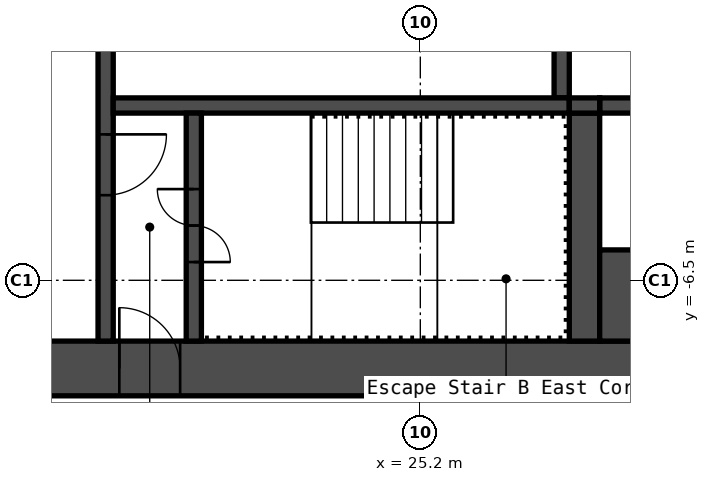
"""IFC4 building model, lengths in metres.
Left out: names, types, materials, properties, quantities, classifications, styles, units other than length and angle.
Written with IfcOpenShell. Run it as: python <this file> out.ifc"""

import sys

from ifc_helpers import new_model, si_unit, direction, frame, frame_2d, origin, place, context, subcontext, project, spatial, rectangle, extrude, element, fill, save


model = new_model("IFC4")
c1 = context("Model", 3, precision=1e-05, world=origin(), true_north=direction((0.0, 1.0)))
c2 = subcontext(c1, "Body", "Model", "MODEL_VIEW")
j1 = project(units=[si_unit("LENGTHUNIT", "METRE"), si_unit("PLANEANGLEUNIT", "RADIAN")], contexts=[c1])
p1 = place(None, origin())
s1 = spatial("IfcSite", under=j1, at=p1, CompositionType="ELEMENT")
p2 = place(p1, origin())
s2 = spatial("IfcBuilding", under=s1, at=p2, CompositionType="ELEMENT")
p3 = place(p2, frame((0.0, 0.0, 156.6)))
s3 = spatial("IfcBuildingStorey", under=s2, at=p3, CompositionType="ELEMENT", Elevation=156.6)
p4 = place(p3, frame((17.7, -7.95, 0.0), z_axis=(0.0, 0.0, 1.0), x_axis=(1.0, 0.0, 0.0)))
e1 = element("IfcWall", 1, at=p4, inside=s3, PredefinedType="SHEAR", context=c2, shape_type="SweptSolid", body=[
    extrude(rectangle(XDim=15.0, YDim=0.9, at=frame_2d((7.5, 0.0))), origin(), (0.0, 0.0, 1.0), 2.75),
])
p5 = place(p4, frame((2.55, 0.0, 0.0)))
e2 = element("IfcOpeningElement", 2, at=p5, cuts=e1, PredefinedType="OPENING", context=c2, shape_type="SweptSolid", body=[
    extrude(rectangle(XDim=1.0, YDim=2.1, at=frame_2d((0.5, 1.05))), frame((0.0, 0.46, 0.0), z_axis=(0.0, -1.0, 0.0), x_axis=(1.0, 0.0, 0.0)), (0.0, 0.0, 1.0), 0.92),
])
p6 = place(p3, frame((20.025, -7.5, 0.0), z_axis=(0.0, 0.0, 1.0), x_axis=(0.0, 1.0, 0.0)))
e3 = element("IfcWall", 3, at=p6, inside=s3, PredefinedType="SHEAR", context=c2, shape_type="SweptSolid", body=[
    extrude(rectangle(XDim=6.3, YDim=0.25, at=frame_2d((3.15, 0.0))), origin(), (0.0, 0.0, 1.0), 2.75),
])
p7 = place(p6, frame((2.4, 0.0, 0.0)))
e4 = element("IfcOpeningElement", 4, at=p7, cuts=e3, PredefinedType="OPENING", context=c2, shape_type="SweptSolid", body=[
    extrude(rectangle(XDim=1.0, YDim=2.1, at=frame_2d((0.5, 1.05))), frame((0.0, 0.135, 0.0), z_axis=(0.0, -1.0, 0.0), x_axis=(1.0, 0.0, 0.0)), (0.0, 0.0, 1.0), 0.27),
])
p8 = place(p3, frame((27.525, -3.5, 0.0), z_axis=(0.0, 0.0, 1.0), x_axis=(0.0, 1.0, 0.0)))
e5 = element("IfcWall", 5, at=p8, inside=s3, PredefinedType="SHEAR", context=c2, shape_type="SweptSolid", body=[
    extrude(rectangle(XDim=2.05, YDim=0.25, at=frame_2d((1.025, 0.0))), origin(), (0.0, 0.0, 1.0), 2.75),
])
p9 = place(p3, frame((20.15, -3.625, 0.0), z_axis=(0.0, 0.0, 1.0), x_axis=(1.0, 0.0, 0.0)))
e6 = element("IfcWall", 6, at=p9, inside=s3, PredefinedType="SHEAR", context=c2, shape_type="SweptSolid", body=[
    extrude(rectangle(XDim=7.5, YDim=0.25, at=frame_2d((3.75, 0.0))), origin(), (0.0, 0.0, 1.0), 2.75),
])
p10 = place(p3, frame((21.475, -7.5, 0.0), z_axis=(0.0, 0.0, 1.0), x_axis=(0.0, 1.0, 0.0)))
e7 = element("IfcWall", 7, at=p10, inside=s3, PredefinedType="SHEAR", context=c2, shape_type="SweptSolid", body=[
    extrude(rectangle(XDim=3.75, YDim=0.25, at=frame_2d((1.875, 0.0))), origin(), (0.0, 0.0, 1.0), 2.75),
])
p11 = place(p10, frame((1.3, 0.0, 0.0)))
e8 = element("IfcOpeningElement", 8, at=p11, cuts=e7, PredefinedType="OPENING", context=c2, shape_type="SweptSolid", body=[
    extrude(rectangle(XDim=1.2, YDim=2.1, at=frame_2d((0.6, 1.05))), frame((0.0, 0.135, 0.0), z_axis=(0.0, -1.0, 0.0), x_axis=(1.0, 0.0, 0.0)), (0.0, 0.0, 1.0), 0.27),
])
p12 = place(p3, frame((27.9, -7.5, 0.0), z_axis=(0.0, 0.0, 1.0), x_axis=(0.0, 1.0, 0.0)))
e9 = element("IfcWall", 9, at=p12, inside=s3, PredefinedType="SHEAR", context=c2, shape_type="SweptSolid", body=[
    extrude(rectangle(XDim=3.75, YDim=0.5, at=frame_2d((1.875, 0.0))), origin(), (0.0, 0.0, 1.0), 2.75),
])
p13 = place(p3, frame((28.15, -3.625, 0.0), z_axis=(0.0, 0.0, 1.0), x_axis=(1.0, 0.0, 0.0)))
e10 = element("IfcWall", 10, at=p13, inside=s3, PredefinedType="SHEAR", context=c2, shape_type="SweptSolid", body=[
    extrude(rectangle(XDim=4.55, YDim=0.25, at=frame_2d((2.275, 0.0))), origin(), (0.0, 0.0, 1.0), 2.75),
])
p14 = place(p3, frame((28.15, -6.75, 0.0), z_axis=(0.0, 0.0, 1.0), x_axis=(1.0, 0.0, 0.0)))
e11 = element("IfcWall", 11, at=p14, inside=s3, PredefinedType="SHEAR", context=c2, shape_type="SweptSolid", body=[
    extrude(rectangle(XDim=4.55, YDim=1.5, at=frame_2d((2.275, 0.0))), origin(), (0.0, 0.0, 1.0), 2.75),
])
p15 = place(p3, frame((27.65, -3.625, 0.0), z_axis=(0.0, 0.0, 1.0), x_axis=(1.0, 0.0, 0.0)))
e12 = element("IfcWall", 12, at=p15, inside=s3, PredefinedType="SHEAR", context=c2, shape_type="SweptSolid", body=[
    extrude(rectangle(XDim=0.5, YDim=0.25, at=frame_2d((0.25, 0.0))), origin(), (0.0, 0.0, 1.0), 2.75),
])
p16 = place(p5, origin())
e13 = element("IfcDoor", 13, at=p16, inside=s3, OperationType="SINGLE_SWING_RIGHT", PredefinedType="DOOR", context=c2, shape_type="SweptSolid", body=[
    extrude(rectangle(XDim=1.0, YDim=2.1, at=frame_2d((0.5, 1.05))), frame((0.0, 0.025, 0.0), z_axis=(0.0, -1.0, 0.0), x_axis=(1.0, 0.0, 0.0)), (0.0, 0.0, 1.0), 0.05),
])
fill(e2, e13)
p17 = place(p11, origin())
e14 = element("IfcDoor", 14, at=p17, inside=s3, OperationType="DOUBLE_DOOR_SINGLE_SWING", PredefinedType="DOOR", context=c2, shape_type="SweptSolid", body=[
    extrude(rectangle(XDim=1.2, YDim=2.1, at=frame_2d((0.6, 1.05))), frame((0.0, 0.025, 0.0), z_axis=(0.0, -1.0, 0.0), x_axis=(1.0, 0.0, 0.0)), (0.0, 0.0, 1.0), 0.05),
])
fill(e8, e14)
p18 = place(p7, origin())
e15 = element("IfcDoor", 15, at=p18, inside=s3, OperationType="SINGLE_SWING_RIGHT", PredefinedType="DOOR", context=c2, shape_type="SweptSolid", body=[
    extrude(rectangle(XDim=1.0, YDim=2.1, at=frame_2d((0.5, 1.05))), frame((0.0, 0.025, 0.0), z_axis=(0.0, -1.0, 0.0), x_axis=(1.0, 0.0, 0.0)), (0.0, 0.0, 1.0), 0.05),
])
fill(e4, e15)
save(model, sys.argv[1])
